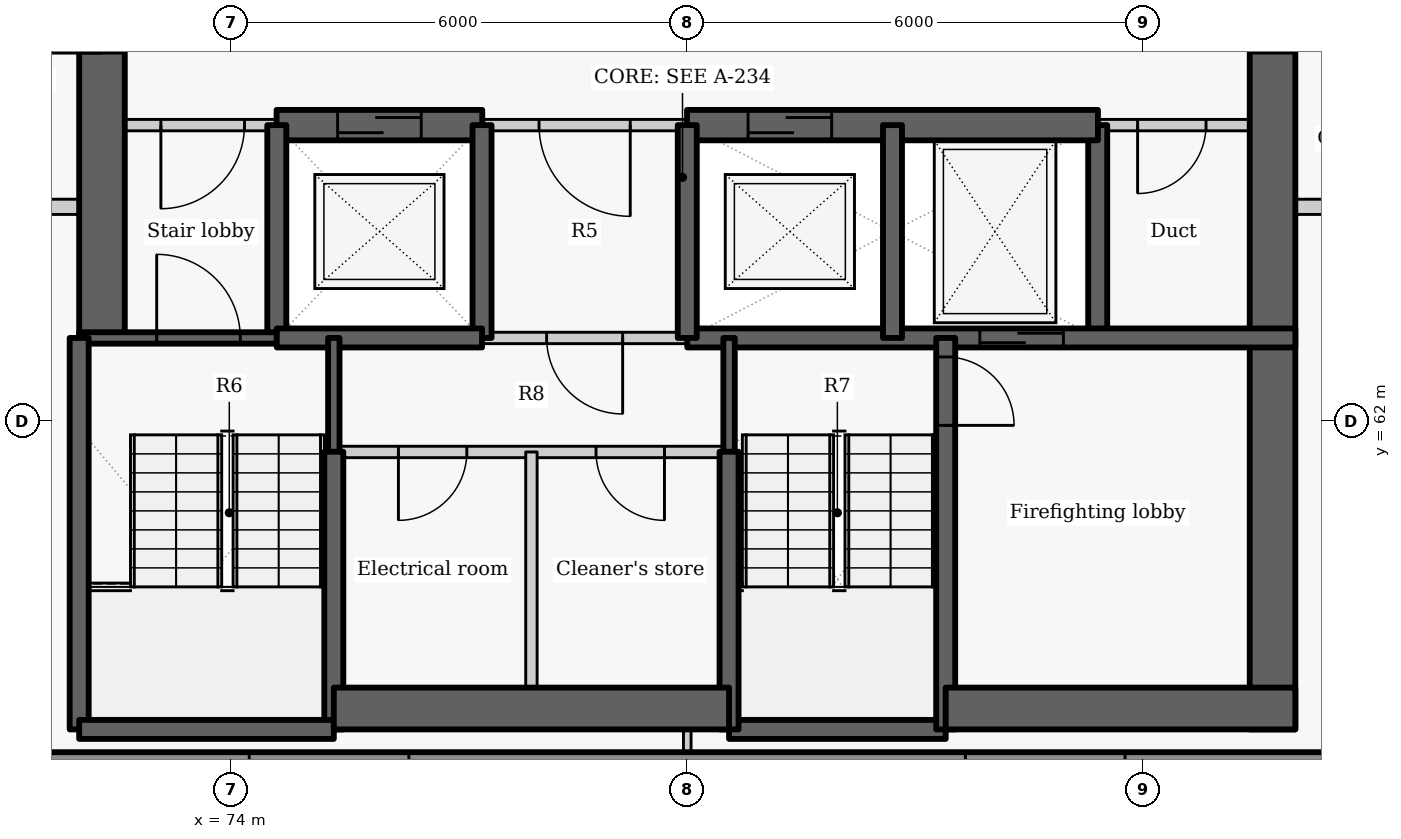
"""IFC4 building model, lengths in metres.
Left out: names, types, materials, properties, quantities, classifications, styles, units other than length and angle.
Written with IfcOpenShell. Run it as: python <this file> out.ifc"""

import sys

from ifc_helpers import new_model, si_unit, direction, frame, frame_2d, origin, place, context, subcontext, project, spatial, rectangle, extrude, element, fill, save


model = new_model("IFC4")
c1 = context("Model", 3, precision=1e-05, world=origin(), true_north=direction((0.0, 1.0)))
c2 = subcontext(c1, "Body", "Model", "MODEL_VIEW")
j1 = project(units=[si_unit("LENGTHUNIT", "METRE"), si_unit("PLANEANGLEUNIT", "RADIAN")], contexts=[c1])
p1 = place(None, origin())
s1 = spatial("IfcSite", under=j1, at=p1, CompositionType="ELEMENT")
p2 = place(p1, origin())
s2 = spatial("IfcBuilding", under=s1, at=p2, CompositionType="ELEMENT")
p3 = place(p2, frame((0.0, 0.0, 193.2)))
s3 = spatial("IfcBuildingStorey", under=s2, at=p3, CompositionType="ELEMENT", Elevation=193.2)
p4 = place(p3, frame((70.551, 57.5, 0.0), z_axis=(0.0, 0.0, 1.0), x_axis=(1.0, 0.0, 0.0)))
e1 = element("IfcWall", 1, at=p4, inside=s3, PredefinedType="SOLIDWALL", context=c2, shape_type="SweptSolid", body=[
    extrude(rectangle(XDim=18.893, YDim=0.3, at=frame_2d((9.446, 0.0))), origin(), (0.0, 0.0, 1.0), 2.425),
])
p5 = place(p4, frame((3.687, 0.0, 0.9)))
e2 = element("IfcOpeningElement", 2, at=p5, cuts=e1, PredefinedType="OPENING", context=c2, shape_type="SweptSolid", body=[
    extrude(rectangle(XDim=2.1, YDim=1.1, at=frame_2d((1.05, 0.55))), frame((0.0, 0.16, 0.0), z_axis=(0.0, -1.0, 0.0), x_axis=(1.0, 0.0, 0.0)), (0.0, 0.0, 1.0), 0.32),
])
p6 = place(p4, frame((13.109, 0.0, 0.9)))
e3 = element("IfcOpeningElement", 3, at=p6, cuts=e1, PredefinedType="OPENING", context=c2, shape_type="SweptSolid", body=[
    extrude(rectangle(XDim=2.1, YDim=1.1, at=frame_2d((1.05, 0.55))), frame((0.0, 0.16, 0.0), z_axis=(0.0, -1.0, 0.0), x_axis=(1.0, 0.0, 0.0)), (0.0, 0.0, 1.0), 0.32),
])
p7 = place(p3, frame((72.3, 63.1, -0.275), z_axis=(0.0, 0.0, 1.0), x_axis=(0.0, 1.0, 0.0)))
e4 = element("IfcWall", 4, at=p7, inside=s3, PredefinedType="SHEAR", context=c2, shape_type="SweptSolid", body=[
    extrude(rectangle(XDim=9.1, YDim=0.6, at=frame_2d((4.55, 0.0))), origin(), (0.0, 0.0, 1.0), 3.3),
])
p8 = place(p7, frame((3.748, 0.0, 0.275)))
e5 = element("IfcOpeningElement", 5, at=p8, cuts=e4, PredefinedType="OPENING", context=c2, shape_type="SweptSolid", body=[
    extrude(rectangle(XDim=1.5, YDim=2.1, at=frame_2d((0.75, 1.05))), frame((0.0, 0.31, 0.0), z_axis=(0.0, -1.0, 0.0), x_axis=(1.0, 0.0, 0.0)), (0.0, 0.0, 1.0), 0.62),
])
p9 = place(p3, frame((85.4, 63.1, -0.275), z_axis=(0.0, 0.0, 1.0), x_axis=(0.0, 1.0, 0.0)))
e6 = element("IfcWall", 6, at=p9, inside=s3, PredefinedType="SHEAR", context=c2, shape_type="SweptSolid", body=[
    extrude(rectangle(XDim=2.8, YDim=0.25, at=frame_2d((1.4, 0.0))), origin(), (0.0, 0.0, 1.0), 3.3),
])
p10 = place(p3, frame((87.7, 72.2, -0.275), z_axis=(0.0, 0.0, 1.0), x_axis=(0.0, -1.0, 0.0)))
e7 = element("IfcWall", 7, at=p10, inside=s3, PredefinedType="SHEAR", context=c2, shape_type="SweptSolid", body=[
    extrude(rectangle(XDim=14.25, YDim=0.6, at=frame_2d((7.125, 0.0))), origin(), (0.0, 0.0, 1.0), 3.3),
])
p11 = place(p10, frame((3.852, 0.0, 0.275)))
e8 = element("IfcOpeningElement", 8, at=p11, cuts=e7, PredefinedType="OPENING", context=c2, shape_type="SweptSolid", body=[
    extrude(rectangle(XDim=1.5, YDim=2.1, at=frame_2d((0.75, 1.05))), frame((0.0, 0.31, 0.0), z_axis=(0.0, -1.0, 0.0), x_axis=(1.0, 0.0, 0.0)), (0.0, 0.0, 1.0), 0.62),
])
p12 = place(p3, frame((74.603, 65.9, 0.0), z_axis=(0.0, 0.0, 1.0), x_axis=(-1.0, 0.0, 0.0)))
e9 = element("IfcWall", 9, at=p12, inside=s3, PredefinedType="PARTITIONING", context=c2, shape_type="SweptSolid", body=[
    extrude(rectangle(XDim=2.603, YDim=0.15, at=frame_2d((1.302, 0.0))), origin(), (0.0, 0.0, 1.0), 3.025),
])
p13 = place(p12, frame((0.428, 0.0, 0.0)))
e10 = element("IfcOpeningElement", 10, at=p13, cuts=e9, PredefinedType="OPENING", context=c2, shape_type="SweptSolid", body=[
    extrude(rectangle(XDim=1.1, YDim=2.1, at=frame_2d((0.55, 1.05))), frame((0.0, 0.085, 0.0), z_axis=(0.0, -1.0, 0.0), x_axis=(1.0, 0.0, 0.0)), (0.0, 0.0, 1.0), 0.17),
])
p14 = place(p3, frame((80.003, 65.9, 0.0), z_axis=(0.0, 0.0, 1.0), x_axis=(-1.0, 0.0, 0.0)))
e11 = element("IfcWall", 11, at=p14, inside=s3, PredefinedType="PARTITIONING", context=c2, shape_type="SweptSolid", body=[
    extrude(rectangle(XDim=2.706, YDim=0.15, at=frame_2d((1.353, 0.0))), origin(), (0.0, 0.0, 1.0), 3.025),
])
p15 = place(p14, frame((0.753, 0.0, 0.0)))
e12 = element("IfcOpeningElement", 12, at=p15, cuts=e11, PredefinedType="OPENING", context=c2, shape_type="SweptSolid", body=[
    extrude(rectangle(XDim=1.2, YDim=2.1, at=frame_2d((0.6, 1.05))), frame((0.0, 0.085, 0.0), z_axis=(0.0, -1.0, 0.0), x_axis=(1.0, 0.0, 0.0)), (0.0, 0.0, 1.0), 0.17),
])
p16 = place(p3, frame((88.0, 65.9, 0.0), z_axis=(0.0, 0.0, 1.0), x_axis=(-1.0, 0.0, 0.0)))
e13 = element("IfcWall", 13, at=p16, inside=s3, PredefinedType="PARTITIONING", context=c2, shape_type="SweptSolid", body=[
    extrude(rectangle(XDim=2.603, YDim=0.15, at=frame_2d((1.302, 0.0))), origin(), (0.0, 0.0, 1.0), 3.025),
])
p17 = place(p16, frame((1.175, 0.0, 0.0)))
e14 = element("IfcOpeningElement", 14, at=p17, cuts=e13, PredefinedType="OPENING", context=c2, shape_type="SweptSolid", body=[
    extrude(rectangle(XDim=0.9, YDim=2.1, at=frame_2d((0.45, 1.05))), frame((0.0, 0.085, 0.0), z_axis=(0.0, -1.0, 0.0), x_axis=(1.0, 0.0, 0.0)), (0.0, 0.0, 1.0), 0.17),
])
p18 = place(p3, frame((74.597, 65.9, -0.275), z_axis=(0.0, 0.0, 1.0), x_axis=(1.0, 0.0, 0.0)))
e15 = element("IfcWall", 15, at=p18, inside=s3, PredefinedType="SHEAR", context=c2, shape_type="SweptSolid", body=[
    extrude(rectangle(XDim=2.706, YDim=0.4, at=frame_2d((1.353, 0.0))), origin(), (0.0, 0.0, 1.0), 3.3),
])
p19 = place(p18, frame((0.803, 0.0, 0.275)))
e16 = element("IfcOpeningElement", 16, at=p19, cuts=e15, PredefinedType="OPENING", context=c2, shape_type="SweptSolid", body=[
    extrude(rectangle(XDim=1.1, YDim=2.1, at=frame_2d((0.55, 1.05))), frame((0.0, 0.21, 0.0), z_axis=(0.0, -1.0, 0.0), x_axis=(1.0, 0.0, 0.0)), (0.0, 0.0, 1.0), 0.42),
])
p20 = place(p3, frame((79.997, 65.9, -0.275), z_axis=(0.0, 0.0, 1.0), x_axis=(1.0, 0.0, 0.0)))
e17 = element("IfcWall", 17, at=p20, inside=s3, PredefinedType="SHEAR", context=c2, shape_type="SweptSolid", body=[
    extrude(rectangle(XDim=5.406, YDim=0.4, at=frame_2d((2.703, 0.0))), origin(), (0.0, 0.0, 1.0), 3.3),
])
p21 = place(p20, frame((0.803, 0.0, 0.275)))
e18 = element("IfcOpeningElement", 18, at=p21, cuts=e17, PredefinedType="OPENING", context=c2, shape_type="SweptSolid", body=[
    extrude(rectangle(XDim=1.1, YDim=2.1, at=frame_2d((0.55, 1.05))), frame((0.0, 0.21, 0.0), z_axis=(0.0, -1.0, 0.0), x_axis=(1.0, 0.0, 0.0)), (0.0, 0.0, 1.0), 0.42),
])
p22 = place(p3, frame((74.6, 63.1, -0.275), z_axis=(0.0, 0.0, 1.0), x_axis=(0.0, 1.0, 0.0)))
e19 = element("IfcWall", 19, at=p22, inside=s3, PredefinedType="SHEAR", context=c2, shape_type="SweptSolid", body=[
    extrude(rectangle(XDim=2.8, YDim=0.25, at=frame_2d((1.4, 0.0))), origin(), (0.0, 0.0, 1.0), 3.3),
])
p23 = place(p3, frame((72.0, 63.1, -0.275), z_axis=(0.0, 0.0, 1.0), x_axis=(1.0, 0.0, 0.0)))
e20 = element("IfcWall", 20, at=p23, inside=s3, PredefinedType="SHEAR", context=c2, shape_type="SweptSolid", body=[
    extrude(rectangle(XDim=2.6, YDim=0.15, at=frame_2d((1.3, 0.0))), origin(), (0.0, 0.0, 1.0), 3.3),
])
p24 = place(p23, frame((1.02, 0.0, 0.275)))
e21 = element("IfcOpeningElement", 21, at=p24, cuts=e20, PredefinedType="OPENING", context=c2, shape_type="SweptSolid", body=[
    extrude(rectangle(XDim=1.1, YDim=2.1, at=frame_2d((0.55, 1.05))), frame((0.0, 0.085, 0.0), z_axis=(0.0, -1.0, 0.0), x_axis=(1.0, 0.0, 0.0)), (0.0, 0.0, 1.0), 0.17),
])
p25 = place(p3, frame((77.3, 63.1, -0.275), z_axis=(0.0, 0.0, 1.0), x_axis=(0.0, 1.0, 0.0)))
e22 = element("IfcWall", 22, at=p25, inside=s3, PredefinedType="SHEAR", context=c2, shape_type="SweptSolid", body=[
    extrude(rectangle(XDim=2.8, YDim=0.25, at=frame_2d((1.4, 0.0))), origin(), (0.0, 0.0, 1.0), 3.3),
])
p26 = place(p3, frame((74.6, 63.1, -0.275), z_axis=(0.0, 0.0, 1.0), x_axis=(1.0, 0.0, 0.0)))
e23 = element("IfcWall", 23, at=p26, inside=s3, PredefinedType="SHEAR", context=c2, shape_type="SweptSolid", body=[
    extrude(rectangle(XDim=2.7, YDim=0.25, at=frame_2d((1.35, 0.0))), origin(), (0.0, 0.0, 1.0), 3.3),
])
p27 = place(p3, frame((80.0, 63.1, -0.275), z_axis=(0.0, 0.0, 1.0), x_axis=(1.0, 0.0, 0.0)))
e24 = element("IfcWall", 24, at=p27, inside=s3, PredefinedType="SHEAR", context=c2, shape_type="SweptSolid", body=[
    extrude(rectangle(XDim=8.0, YDim=0.25, at=frame_2d((4.0, 0.0))), origin(), (0.0, 0.0, 1.0), 3.3),
])
p28 = place(p27, frame((3.849, 0.0, 0.275)))
e25 = element("IfcOpeningElement", 25, at=p28, cuts=e24, PredefinedType="OPENING", context=c2, shape_type="SweptSolid", body=[
    extrude(rectangle(XDim=1.1, YDim=2.1, at=frame_2d((0.55, 1.05))), frame((0.0, 0.135, 0.0), z_axis=(0.0, -1.0, 0.0), x_axis=(1.0, 0.0, 0.0)), (0.0, 0.0, 1.0), 0.27),
])
p29 = place(p3, frame((80.0, 63.1, -0.275), z_axis=(0.0, 0.0, 1.0), x_axis=(0.0, 1.0, 0.0)))
e26 = element("IfcWall", 26, at=p29, inside=s3, PredefinedType="SHEAR", context=c2, shape_type="SweptSolid", body=[
    extrude(rectangle(XDim=2.8, YDim=0.25, at=frame_2d((1.4, 0.0))), origin(), (0.0, 0.0, 1.0), 3.3),
])
p30 = place(p3, frame((80.0, 63.1, 0.0), z_axis=(0.0, 0.0, 1.0), x_axis=(-1.0, 0.0, 0.0)))
e27 = element("IfcWall", 27, at=p30, inside=s3, PredefinedType="PARTITIONING", context=c2, shape_type="SweptSolid", body=[
    extrude(rectangle(XDim=2.7, YDim=0.15, at=frame_2d((1.35, 0.0))), origin(), (0.0, 0.0, 1.0), 3.025),
])
p31 = place(p30, frame((0.85, 0.0, 0.0)))
e28 = element("IfcOpeningElement", 28, at=p31, cuts=e27, PredefinedType="OPENING", context=c2, shape_type="SweptSolid", body=[
    extrude(rectangle(XDim=1.0, YDim=2.1, at=frame_2d((0.5, 1.05))), frame((0.0, 0.085, 0.0), z_axis=(0.0, -1.0, 0.0), x_axis=(1.0, 0.0, 0.0)), (0.0, 0.0, 1.0), 0.17),
])
p32 = place(p3, frame((82.7, 63.1, -0.275), z_axis=(0.0, 0.0, 1.0), x_axis=(0.0, 1.0, 0.0)))
e29 = element("IfcWall", 29, at=p32, inside=s3, PredefinedType="SHEAR", context=c2, shape_type="SweptSolid", body=[
    extrude(rectangle(XDim=2.8, YDim=0.25, at=frame_2d((1.4, 0.0))), origin(), (0.0, 0.0, 1.0), 3.3),
])
p33 = place(p3, frame((75.35, 61.597, -0.275), z_axis=(0.0, 0.0, 1.0), x_axis=(0.0, 1.0, 0.0)))
e30 = element("IfcWall", 30, at=p33, inside=s3, PredefinedType="SHEAR", context=c2, shape_type="SweptSolid", body=[
    extrude(rectangle(XDim=1.503, YDim=0.15, at=frame_2d((0.751, 0.0))), origin(), (0.0, 0.0, 1.0), 3.3),
])
p34 = place(p3, frame((75.35, 57.95, -0.275), z_axis=(0.0, 0.0, 1.0), x_axis=(0.0, 1.0, 0.0)))
e31 = element("IfcWall", 31, at=p34, inside=s3, PredefinedType="SHEAR", context=c2, shape_type="SweptSolid", body=[
    extrude(rectangle(XDim=3.653, YDim=0.25, at=frame_2d((1.827, 0.0))), origin(), (0.0, 0.0, 1.0), 3.3),
])
p35 = place(p3, frame((72.0, 57.95, -0.275), z_axis=(0.0, 0.0, 1.0), x_axis=(0.0, 1.0, 0.0)))
e32 = element("IfcWall", 32, at=p35, inside=s3, PredefinedType="SHEAR", context=c2, shape_type="SweptSolid", body=[
    extrude(rectangle(XDim=5.15, YDim=0.25, at=frame_2d((2.575, 0.0))), origin(), (0.0, 0.0, 1.0), 3.3),
])
p36 = place(p3, frame((72.0, 57.95, -0.275), z_axis=(0.0, 0.0, 1.0), x_axis=(1.0, 0.0, 0.0)))
e33 = element("IfcWall", 33, at=p36, inside=s3, PredefinedType="SHEAR", context=c2, shape_type="SweptSolid", body=[
    extrude(rectangle(XDim=3.35, YDim=0.25, at=frame_2d((1.675, 0.0))), origin(), (0.0, 0.0, 1.0), 3.3),
])
p37 = place(p3, frame((80.55, 57.95, -0.275), z_axis=(0.0, 0.0, 1.0), x_axis=(1.0, 0.0, 0.0)))
e34 = element("IfcWall", 34, at=p37, inside=s3, PredefinedType="SHEAR", context=c2, shape_type="SweptSolid", body=[
    extrude(rectangle(XDim=2.85, YDim=0.25, at=frame_2d((1.425, 0.0))), origin(), (0.0, 0.0, 1.0), 3.3),
])
p38 = place(p3, frame((83.4, 63.1, -0.275), z_axis=(0.0, 0.0, 1.0), x_axis=(0.0, -1.0, 0.0)))
e35 = element("IfcWall", 35, at=p38, inside=s3, PredefinedType="SHEAR", context=c2, shape_type="SweptSolid", body=[
    extrude(rectangle(XDim=5.15, YDim=0.25, at=frame_2d((2.575, 0.0))), origin(), (0.0, 0.0, 1.0), 3.3),
])
p39 = place(p38, frame((0.25, 0.0, 0.275)))
e36 = element("IfcOpeningElement", 36, at=p39, cuts=e35, PredefinedType="OPENING", context=c2, shape_type="SweptSolid", body=[
    extrude(rectangle(XDim=0.9, YDim=2.1, at=frame_2d((0.45, 1.05))), frame((0.0, 0.135, 0.0), z_axis=(0.0, -1.0, 0.0), x_axis=(1.0, 0.0, 0.0)), (0.0, 0.0, 1.0), 0.27),
])
p40 = place(p3, frame((80.55, 61.597, -0.275), z_axis=(0.0, 0.0, 1.0), x_axis=(0.0, 1.0, 0.0)))
e37 = element("IfcWall", 37, at=p40, inside=s3, PredefinedType="SHEAR", context=c2, shape_type="SweptSolid", body=[
    extrude(rectangle(XDim=1.503, YDim=0.15, at=frame_2d((0.751, 0.0))), origin(), (0.0, 0.0, 1.0), 3.3),
])
p41 = place(p3, frame((80.55, 57.95, -0.275), z_axis=(0.0, 0.0, 1.0), x_axis=(0.0, 1.0, 0.0)))
e38 = element("IfcWall", 38, at=p41, inside=s3, PredefinedType="SHEAR", context=c2, shape_type="SweptSolid", body=[
    extrude(rectangle(XDim=3.653, YDim=0.25, at=frame_2d((1.827, 0.0))), origin(), (0.0, 0.0, 1.0), 3.3),
])
p42 = place(p3, frame((75.35, 58.225, -0.275), z_axis=(0.0, 0.0, 1.0), x_axis=(1.0, 0.0, 0.0)))
e39 = element("IfcWall", 39, at=p42, inside=s3, PredefinedType="SHEAR", context=c2, shape_type="SweptSolid", body=[
    extrude(rectangle(XDim=5.2, YDim=0.55, at=frame_2d((2.6, 0.0))), origin(), (0.0, 0.0, 1.0), 3.3),
])
p43 = place(p3, frame((83.4, 58.225, -0.275), z_axis=(0.0, 0.0, 1.0), x_axis=(1.0, 0.0, 0.0)))
e40 = element("IfcWall", 40, at=p43, inside=s3, PredefinedType="SHEAR", context=c2, shape_type="SweptSolid", body=[
    extrude(rectangle(XDim=4.6, YDim=0.55, at=frame_2d((2.3, 0.0))), origin(), (0.0, 0.0, 1.0), 3.3),
])
p44 = place(p3, frame((80.55, 61.6, 0.0), z_axis=(0.0, 0.0, 1.0), x_axis=(-1.0, 0.0, 0.0)))
e41 = element("IfcWall", 41, at=p44, inside=s3, PredefinedType="PARTITIONING", context=c2, shape_type="SweptSolid", body=[
    extrude(rectangle(XDim=5.2, YDim=0.15, at=frame_2d((2.6, 0.0))), origin(), (0.0, 0.0, 1.0), 3.025),
])
p45 = place(p44, frame((3.45, 0.0, 0.0)))
e42 = element("IfcOpeningElement", 42, at=p45, cuts=e41, PredefinedType="OPENING", context=c2, shape_type="SweptSolid", body=[
    extrude(rectangle(XDim=0.9, YDim=2.1, at=frame_2d((0.45, 1.05))), frame((0.0, 0.085, 0.0), z_axis=(0.0, -1.0, 0.0), x_axis=(1.0, 0.0, 0.0)), (0.0, 0.0, 1.0), 0.17),
])
p46 = place(p44, frame((0.85, 0.0, 0.0)))
e43 = element("IfcOpeningElement", 43, at=p46, cuts=e41, PredefinedType="OPENING", context=c2, shape_type="SweptSolid", body=[
    extrude(rectangle(XDim=0.9, YDim=2.1, at=frame_2d((0.45, 1.05))), frame((0.0, 0.085, 0.0), z_axis=(0.0, -1.0, 0.0), x_axis=(1.0, 0.0, 0.0)), (0.0, 0.0, 1.0), 0.17),
])
p47 = place(p3, frame((77.95, 57.95, 0.0), z_axis=(0.0, 0.0, 1.0), x_axis=(0.0, 1.0, 0.0)))
e44 = element("IfcWall", 44, at=p47, inside=s3, PredefinedType="PARTITIONING", context=c2, shape_type="SweptSolid", body=[
    extrude(rectangle(XDim=3.65, YDim=0.15, at=frame_2d((1.825, 0.0))), origin(), (0.0, 0.0, 1.0), 3.025),
])
p48 = place(p3, frame((70.527, 64.825, 0.0), z_axis=(0.0, 0.0, 1.0), x_axis=(1.0, 0.0, 0.0)))
e45 = element("IfcWall", 45, at=p48, inside=s3, PredefinedType="PARTITIONING", context=c2, shape_type="SweptSolid", body=[
    extrude(rectangle(XDim=1.473, YDim=0.2, at=frame_2d((0.736, 0.0))), origin(), (0.0, 0.0, 1.0), 3.025),
])
p49 = place(p3, frame((88.0, 64.825, 0.0), z_axis=(0.0, 0.0, 1.0), x_axis=(1.0, 0.0, 0.0)))
e46 = element("IfcWall", 46, at=p49, inside=s3, PredefinedType="PARTITIONING", context=c2, shape_type="SweptSolid", body=[
    extrude(rectangle(XDim=2.413, YDim=0.2, at=frame_2d((1.207, 0.0))), origin(), (0.0, 0.0, 1.0), 2.505),
])
p50 = place(p3, frame((80.0, 57.65, 0.0), z_axis=(0.0, 0.0, 1.0), x_axis=(0.0, 1.0, 0.0)))
e47 = element("IfcWall", 47, at=p50, inside=s3, PredefinedType="PARTITIONING", context=c2, shape_type="SweptSolid", body=[
    extrude(rectangle(XDim=0.3, YDim=0.1, at=frame_2d((0.15, 0.0))), origin(), (0.0, 0.0, 1.0), 3.025),
])
p51 = place(p13, origin())
e48 = element("IfcDoor", 48, at=p51, inside=s3, OperationType="SINGLE_SWING_RIGHT", PredefinedType="DOOR", context=c2, shape_type="SweptSolid", body=[
    extrude(rectangle(XDim=1.1, YDim=2.1, at=frame_2d((0.55, 1.05))), frame((0.0, 0.025, 0.0), z_axis=(0.0, -1.0, 0.0), x_axis=(1.0, 0.0, 0.0)), (0.0, 0.0, 1.0), 0.05),
])
fill(e10, e48)
p52 = place(p19, origin())
e49 = element("IfcDoor", 49, at=p52, inside=s3, OperationType="SLIDING_TO_LEFT", PredefinedType="DOOR", context=c2, shape_type="SweptSolid", body=[
    extrude(rectangle(XDim=1.1, YDim=2.1, at=frame_2d((0.55, 1.05))), frame((0.0, 0.025, 0.0), z_axis=(0.0, -1.0, 0.0), x_axis=(1.0, 0.0, 0.0)), (0.0, 0.0, 1.0), 0.05),
])
fill(e16, e49)
p53 = place(p15, origin())
e50 = element("IfcDoor", 50, at=p53, inside=s3, OperationType="DOUBLE_DOOR_SINGLE_SWING", PredefinedType="DOOR", context=c2, shape_type="SweptSolid", body=[
    extrude(rectangle(XDim=1.2, YDim=2.1, at=frame_2d((0.6, 1.05))), frame((0.0, 0.025, 0.0), z_axis=(0.0, -1.0, 0.0), x_axis=(1.0, 0.0, 0.0)), (0.0, 0.0, 1.0), 0.05),
])
fill(e12, e50)
p54 = place(p21, origin())
e51 = element("IfcDoor", 51, at=p54, inside=s3, OperationType="SLIDING_TO_LEFT", PredefinedType="DOOR", context=c2, shape_type="SweptSolid", body=[
    extrude(rectangle(XDim=1.1, YDim=2.1, at=frame_2d((0.55, 1.05))), frame((0.0, 0.025, 0.0), z_axis=(0.0, -1.0, 0.0), x_axis=(1.0, 0.0, 0.0)), (0.0, 0.0, 1.0), 0.05),
])
fill(e18, e51)
p55 = place(p28, origin())
e52 = element("IfcDoor", 52, at=p55, inside=s3, OperationType="SLIDING_TO_LEFT", PredefinedType="DOOR", context=c2, shape_type="SweptSolid", body=[
    extrude(rectangle(XDim=1.1, YDim=2.1, at=frame_2d((0.55, 1.05))), frame((0.0, 0.025, 0.0), z_axis=(0.0, -1.0, 0.0), x_axis=(1.0, 0.0, 0.0)), (0.0, 0.0, 1.0), 0.05),
])
fill(e25, e52)
p56 = place(p17, origin())
e53 = element("IfcDoor", 53, at=p56, inside=s3, OperationType="SINGLE_SWING_RIGHT", PredefinedType="DOOR", context=c2, shape_type="SweptSolid", body=[
    extrude(rectangle(XDim=0.9, YDim=2.1, at=frame_2d((0.45, 1.05))), frame((0.0, 0.025, 0.0), z_axis=(0.0, -1.0, 0.0), x_axis=(1.0, 0.0, 0.0)), (0.0, 0.0, 1.0), 0.05),
])
fill(e14, e53)
p57 = place(p31, origin())
e54 = element("IfcDoor", 54, at=p57, inside=s3, OperationType="SINGLE_SWING_LEFT", PredefinedType="DOOR", context=c2, shape_type="SweptSolid", body=[
    extrude(rectangle(XDim=1.0, YDim=2.1, at=frame_2d((0.5, 1.05))), frame((0.0, 0.025, 0.0), z_axis=(0.0, -1.0, 0.0), x_axis=(1.0, 0.0, 0.0)), (0.0, 0.0, 1.0), 0.05),
])
fill(e28, e54)
p58 = place(p45, origin())
e55 = element("IfcDoor", 55, at=p58, inside=s3, OperationType="SINGLE_SWING_RIGHT", PredefinedType="DOOR", context=c2, shape_type="SweptSolid", body=[
    extrude(rectangle(XDim=0.9, YDim=2.1, at=frame_2d((0.45, 1.05))), frame((0.0, 0.025, 0.0), z_axis=(0.0, -1.0, 0.0), x_axis=(1.0, 0.0, 0.0)), (0.0, 0.0, 1.0), 0.05),
])
fill(e42, e55)
p59 = place(p46, origin())
e56 = element("IfcDoor", 56, at=p59, inside=s3, OperationType="SINGLE_SWING_LEFT", PredefinedType="DOOR", context=c2, shape_type="SweptSolid", body=[
    extrude(rectangle(XDim=0.9, YDim=2.1, at=frame_2d((0.45, 1.05))), frame((0.0, 0.025, 0.0), z_axis=(0.0, -1.0, 0.0), x_axis=(1.0, 0.0, 0.0)), (0.0, 0.0, 1.0), 0.05),
])
fill(e43, e56)
p60 = place(p24, origin())
e57 = element("IfcDoor", 57, at=p60, inside=s3, OperationType="SINGLE_SWING_LEFT", PredefinedType="DOOR", context=c2, shape_type="SweptSolid", body=[
    extrude(rectangle(XDim=1.1, YDim=2.1, at=frame_2d((0.55, 1.05))), frame((0.0, 0.025, 0.0), z_axis=(0.0, -1.0, 0.0), x_axis=(1.0, 0.0, 0.0)), (0.0, 0.0, 1.0), 0.05),
])
fill(e21, e57)
p61 = place(p39, origin())
e58 = element("IfcDoor", 58, at=p61, inside=s3, OperationType="SINGLE_SWING_RIGHT", PredefinedType="DOOR", context=c2, shape_type="SweptSolid", body=[
    extrude(rectangle(XDim=0.9, YDim=2.1, at=frame_2d((0.45, 1.05))), frame((0.0, 0.025, 0.0), z_axis=(0.0, -1.0, 0.0), x_axis=(1.0, 0.0, 0.0)), (0.0, 0.0, 1.0), 0.05),
])
fill(e36, e58)
p62 = place(p11, origin())
e59 = element("IfcDoor", 59, at=p62, inside=s3, OperationType="DOUBLE_DOOR_SINGLE_SWING", PredefinedType="DOOR", context=c2, shape_type="SweptSolid", body=[
    extrude(rectangle(XDim=1.5, YDim=2.1, at=frame_2d((0.75, 1.05))), frame((0.0, 0.025, 0.0), z_axis=(0.0, -1.0, 0.0), x_axis=(1.0, 0.0, 0.0)), (0.0, 0.0, 1.0), 0.05),
])
fill(e8, e59)
p63 = place(p8, origin())
e60 = element("IfcDoor", 60, at=p63, inside=s3, OperationType="DOUBLE_DOOR_SINGLE_SWING", PredefinedType="DOOR", context=c2, shape_type="SweptSolid", body=[
    extrude(rectangle(XDim=1.5, YDim=2.1, at=frame_2d((0.75, 1.05))), frame((0.0, 0.025, 0.0), z_axis=(0.0, -1.0, 0.0), x_axis=(1.0, 0.0, 0.0)), (0.0, 0.0, 1.0), 0.05),
])
fill(e5, e60)
save(model, sys.argv[1])
